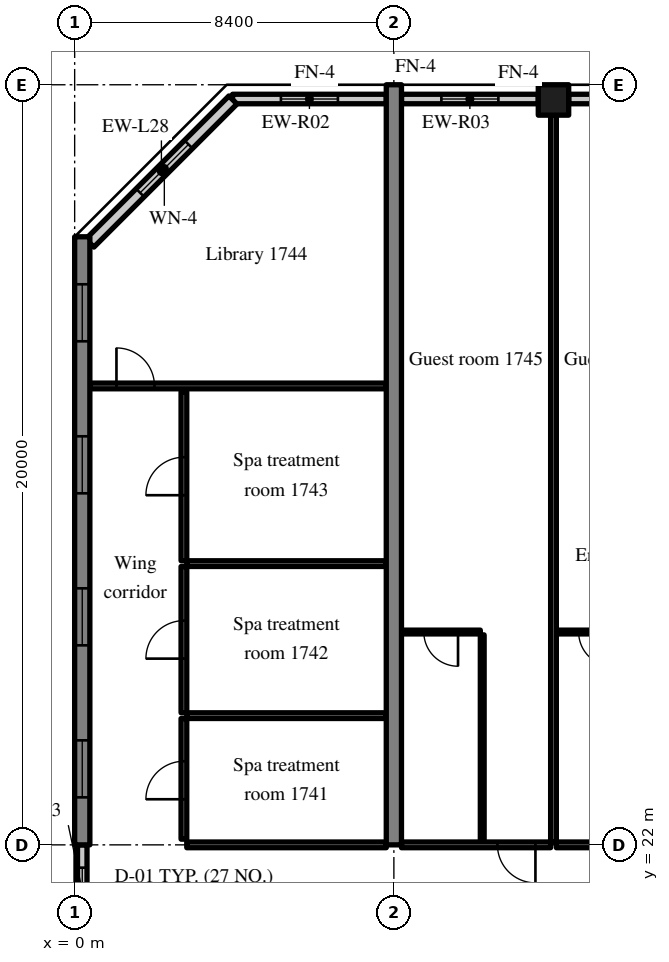
"""IFC4 building model, lengths in metres.
Left out: names, types, materials, properties, quantities, classifications, styles, units other than length and angle.
Written with IfcOpenShell. Run it as: python <this file> out.ifc"""

import sys

from ifc_helpers import new_model, si_unit, direction, frame, frame_2d, origin, origin_2d, place, context, subcontext, project, spatial, rectangle, extrude, source, transform, mapped, element, fill, save


model = new_model("IFC4")
c1 = context("Model", 3, precision=1e-05, world=origin(), true_north=direction((0.0, 1.0)))
c2 = subcontext(c1, "Body", "Model", "MODEL_VIEW")
j1 = project(units=[si_unit("LENGTHUNIT", "METRE"), si_unit("PLANEANGLEUNIT", "RADIAN")], contexts=[c1])
p1 = place(None, origin())
s1 = spatial("IfcSite", under=j1, at=p1, CompositionType="ELEMENT")
p2 = place(p1, origin())
s2 = spatial("IfcBuilding", under=s1, at=p2, CompositionType="ELEMENT")
p3 = place(p2, frame((0.0, 0.0, 73.4)))
s3 = spatial("IfcBuildingStorey", under=s2, at=p3, CompositionType="ELEMENT", Elevation=73.4)
m1 = source(origin(), c2, "Body", "SweptSolid", [
    extrude(rectangle(XDim=16.0, YDim=0.4, at=frame_2d((8.0, 0.0))), origin(), (0.0, 0.0, 1.0), 3.52),
])
p4 = place(p3, frame((0.2, 22.0, 0.0), z_axis=(0.0, 0.0, 1.0), x_axis=(0.0, 1.0, 0.0)))
e1 = element("IfcWall", 1, at=p4, inside=s3, PredefinedType="SHEAR", context=c2, shape_type="MappedRepresentation", body=[
    mapped(m1, transform((0.0, 0.0, 0.0), scale=1.0)),
])
m2 = source(origin(), c2, "Body", "SweptSolid", [
    extrude(rectangle(XDim=1.5, YDim=1.5, at=frame_2d((0.75, 0.75))), frame((0.0, 0.21, 0.0), z_axis=(0.0, -1.0, 0.0), x_axis=(1.0, 0.0, 0.0)), (0.0, 0.0, 1.0), 0.42),
])
p5 = place(p4, frame((1.25, 0.0, 0.9)))
e2 = element("IfcOpeningElement", 2, at=p5, cuts=e1, PredefinedType="OPENING", context=c2, shape_type="MappedRepresentation", body=[
    mapped(m2, transform((0.0, 0.0, 0.0), scale=1.0)),
])
p6 = place(p4, frame((5.25, 0.0, 0.9)))
e3 = element("IfcOpeningElement", 3, at=p6, cuts=e1, PredefinedType="OPENING", context=c2, shape_type="MappedRepresentation", body=[
    mapped(m2, transform((0.0, 0.0, 0.0), scale=1.0)),
])
p7 = place(p4, frame((9.25, 0.0, 0.9)))
e4 = element("IfcOpeningElement", 4, at=p7, cuts=e1, PredefinedType="OPENING", context=c2, shape_type="MappedRepresentation", body=[
    mapped(m2, transform((0.0, 0.0, 0.0), scale=1.0)),
])
p8 = place(p4, frame((13.25, 0.0, 0.9)))
e5 = element("IfcOpeningElement", 5, at=p8, cuts=e1, PredefinedType="OPENING", context=c2, shape_type="MappedRepresentation", body=[
    mapped(m2, transform((0.0, 0.0, 0.0), scale=1.0)),
])
m3 = source(origin(), c2, "Body", "SweptSolid", [
    extrude(rectangle(XDim=20.0, YDim=0.4, at=frame_2d((10.0, 0.0))), origin(), (0.0, 0.0, 1.0), 3.52),
])
p9 = place(p3, frame((8.4, 22.0, 0.0), z_axis=(0.0, 0.0, 1.0), x_axis=(0.0, 1.0, 0.0)))
e6 = element("IfcWall", 6, at=p9, inside=s3, PredefinedType="SHEAR", context=c2, shape_type="MappedRepresentation", body=[
    mapped(m3, transform((0.0, 0.0, 0.0), scale=1.0)),
])
m4 = source(origin(), c2, "Body", "SweptSolid", [
    extrude(rectangle(XDim=0.8, YDim=0.8, at=origin_2d()), origin(), (0.0, 0.0, 1.0), 3.52),
])
p10 = place(p3, frame((12.6, 41.6, 0.0), z_axis=(0.0, 0.0, 1.0), x_axis=(1.0, 0.0, 0.0)))
e7 = element("IfcColumn", 7, at=p10, inside=s3, PredefinedType="COLUMN", context=c2, shape_type="MappedRepresentation", body=[
    mapped(m4, transform((0.0, 0.0, 0.0), scale=1.0)),
])
m5 = source(origin(), c2, "Body", "SweptSolid", [
    extrude(rectangle(XDim=4.045, YDim=0.25, at=frame_2d((2.022, 0.0))), origin(), (0.0, 0.0, 1.0), 2.82),
])
p11 = place(p3, frame((8.2, 41.625, 0.0), z_axis=(0.0, 0.0, 1.0), x_axis=(-1.0, 0.0, 0.0)))
e8 = element("IfcWall", 8, at=p11, inside=s3, PredefinedType="SOLIDWALL", context=c2, shape_type="MappedRepresentation", body=[
    mapped(m5, transform((0.0, 0.0, 0.0), scale=1.0)),
])
m6 = source(origin(), c2, "Body", "SweptSolid", [
    extrude(rectangle(XDim=1.5, YDim=1.5, at=frame_2d((0.75, 0.75))), frame((0.0, 0.135, 0.0), z_axis=(0.0, -1.0, 0.0), x_axis=(1.0, 0.0, 0.0)), (0.0, 0.0, 1.0), 0.27),
])
p12 = place(p11, frame((1.272, 0.0, 0.9)))
e9 = element("IfcOpeningElement", 9, at=p12, cuts=e8, PredefinedType="OPENING", context=c2, shape_type="MappedRepresentation", body=[
    mapped(m6, transform((0.0, 0.0, 0.0), scale=1.0)),
])
m7 = source(origin(), c2, "Body", "SweptSolid", [
    extrude(rectangle(XDim=3.6, YDim=0.25, at=frame_2d((1.8, 0.0))), origin(), (0.0, 0.0, 1.0), 2.82),
])
p13 = place(p3, frame((12.2, 41.625, 0.0), z_axis=(0.0, 0.0, 1.0), x_axis=(-1.0, 0.0, 0.0)))
e10 = element("IfcWall", 10, at=p13, inside=s3, PredefinedType="SOLIDWALL", context=c2, shape_type="MappedRepresentation", body=[
    mapped(m7, transform((0.0, 0.0, 0.0), scale=1.0)),
])
p14 = place(p13, frame((1.05, 0.0, 0.9)))
e11 = element("IfcOpeningElement", 11, at=p14, cuts=e10, PredefinedType="OPENING", context=c2, shape_type="MappedRepresentation", body=[
    mapped(m6, transform((0.0, 0.0, 0.0), scale=1.0)),
])
m8 = source(origin(), c2, "Body", "SweptSolid", [
    extrude(rectangle(XDim=3.6, YDim=0.25, at=frame_2d((1.8, 0.0))), origin(), (0.0, 0.0, 1.0), 2.82),
])
p15 = place(p3, frame((16.6, 41.625, 0.0), z_axis=(0.0, 0.0, 1.0), x_axis=(-1.0, 0.0, 0.0)))
e12 = element("IfcWall", 12, at=p15, inside=s3, PredefinedType="SOLIDWALL", context=c2, shape_type="MappedRepresentation", body=[
    mapped(m8, transform((0.0, 0.0, 0.0), scale=1.0)),
])
p16 = place(p15, frame((1.05, 0.0, 0.9)))
e13 = element("IfcOpeningElement", 13, at=p16, cuts=e12, PredefinedType="OPENING", context=c2, shape_type="MappedRepresentation", body=[
    mapped(m6, transform((0.0, 0.0, 0.0), scale=1.0)),
])
m9 = source(origin(), c2, "Body", "SweptSolid", [
    extrude(rectangle(XDim=5.326, YDim=0.3, at=frame_2d((2.663, 0.0))), origin(), (0.0, 0.0, 1.0), 3.52),
])
p17 = place(p3, frame((4.166, 41.6, 0.0), z_axis=(0.0, 0.0, 1.0), x_axis=(-0.707106781187, -0.707106781187, 0.0)))
e14 = element("IfcWall", 14, at=p17, inside=s3, PredefinedType="SOLIDWALL", context=c2, shape_type="MappedRepresentation", body=[
    mapped(m9, transform((0.0, 0.0, 0.0), scale=1.0)),
])
m10 = source(origin(), c2, "Body", "SweptSolid", [
    extrude(rectangle(XDim=1.8, YDim=1.5, at=frame_2d((0.9, 0.75))), frame((0.0, 0.16, 0.0), z_axis=(0.0, -1.0, 0.0), x_axis=(1.0, 0.0, 0.0)), (0.0, 0.0, 1.0), 0.32),
])
p18 = place(p17, frame((1.654, 0.0, 0.9)))
e15 = element("IfcOpeningElement", 15, at=p18, cuts=e14, PredefinedType="OPENING", context=c2, shape_type="MappedRepresentation", body=[
    mapped(m10, transform((0.0, 0.0, 0.0), scale=1.0)),
])
m11 = source(origin(), c2, "Body", "SweptSolid", [
    extrude(rectangle(XDim=2.4, YDim=0.25, at=frame_2d((1.2, 0.0))), origin(), (0.0, 0.0, 1.0), 2.62),
])
p19 = place(p3, frame((0.2, 19.6, 0.0), z_axis=(0.0, 0.0, 1.0), x_axis=(0.0, 1.0, 0.0)))
e16 = element("IfcWall", 16, at=p19, inside=s3, PredefinedType="SOLIDWALL", context=c2, shape_type="MappedRepresentation", body=[
    mapped(m11, transform((0.0, 0.0, 0.0), scale=1.0)),
])
m12 = source(origin(), c2, "Body", "SweptSolid", [
    extrude(rectangle(XDim=1.2, YDim=1.5, at=frame_2d((0.6, 0.75))), frame((0.0, 0.135, 0.0), z_axis=(0.0, -1.0, 0.0), x_axis=(1.0, 0.0, 0.0)), (0.0, 0.0, 1.0), 0.27),
])
p20 = place(p19, frame((0.6, 0.0, 0.9)))
e17 = element("IfcOpeningElement", 17, at=p20, cuts=e16, PredefinedType="OPENING", context=c2, shape_type="MappedRepresentation", body=[
    mapped(m12, transform((0.0, 0.0, 0.0), scale=1.0)),
])
m13 = source(origin(), c2, "Body", "SweptSolid", [
    extrude(rectangle(XDim=5.25, YDim=0.15, at=frame_2d((2.625, 0.0))), origin(), (0.0, 0.0, 1.0), 2.82),
])
p21 = place(p3, frame((2.95, 22.0, 0.0), z_axis=(0.0, 0.0, 1.0), x_axis=(1.0, 0.0, 0.0)))
e18 = element("IfcWall", 18, at=p21, inside=s3, PredefinedType="PARTITIONING", context=c2, shape_type="MappedRepresentation", body=[
    mapped(m13, transform((0.0, 0.0, 0.0), scale=1.0)),
])
m14 = source(origin(), c2, "Body", "SweptSolid", [
    extrude(rectangle(XDim=3.175, YDim=0.15, at=frame_2d((1.587, 0.0))), origin(), (0.0, 0.0, 1.0), 3.52),
])
p22 = place(p3, frame((2.875, 22.15, 0.0), z_axis=(0.0, 0.0, 1.0), x_axis=(0.0, 1.0, 0.0)))
e19 = element("IfcWall", 19, at=p22, inside=s3, PredefinedType="PARTITIONING", context=c2, shape_type="MappedRepresentation", body=[
    mapped(m14, transform((0.0, 0.0, 0.0), scale=1.0)),
])
m15 = source(origin(), c2, "Body", "SweptSolid", [
    extrude(rectangle(XDim=1.0, YDim=2.1, at=frame_2d((0.5, 1.05))), frame((0.0, 0.085, 0.0), z_axis=(0.0, -1.0, 0.0), x_axis=(1.0, 0.0, 0.0)), (0.0, 0.0, 1.0), 0.17),
])
p23 = place(p22, frame((1.05, 0.0, 0.0)))
e20 = element("IfcOpeningElement", 20, at=p23, cuts=e19, PredefinedType="OPENING", context=c2, shape_type="MappedRepresentation", body=[
    mapped(m15, transform((0.0, 0.0, 0.0), scale=1.0)),
])
m16 = source(origin(), c2, "Body", "SweptSolid", [
    extrude(rectangle(XDim=5.25, YDim=0.15, at=frame_2d((2.625, 0.0))), origin(), (0.0, 0.0, 1.0), 3.52),
])
p24 = place(p3, frame((2.95, 25.4, 0.0), z_axis=(0.0, 0.0, 1.0), x_axis=(1.0, 0.0, 0.0)))
e21 = element("IfcWall", 21, at=p24, inside=s3, PredefinedType="PARTITIONING", context=c2, shape_type="MappedRepresentation", body=[
    mapped(m16, transform((0.0, 0.0, 0.0), scale=1.0)),
])
m17 = source(origin(), c2, "Body", "SweptSolid", [
    extrude(rectangle(XDim=3.85, YDim=0.15, at=frame_2d((1.925, 0.0))), origin(), (0.0, 0.0, 1.0), 3.52),
])
p25 = place(p3, frame((2.875, 25.475, 0.0), z_axis=(0.0, 0.0, 1.0), x_axis=(0.0, 1.0, 0.0)))
e22 = element("IfcWall", 22, at=p25, inside=s3, PredefinedType="PARTITIONING", context=c2, shape_type="MappedRepresentation", body=[
    mapped(m17, transform((0.0, 0.0, 0.0), scale=1.0)),
])
p26 = place(p25, frame((1.425, 0.0, 0.0)))
e23 = element("IfcOpeningElement", 23, at=p26, cuts=e22, PredefinedType="OPENING", context=c2, shape_type="MappedRepresentation", body=[
    mapped(m15, transform((0.0, 0.0, 0.0), scale=1.0)),
])
p27 = place(p3, frame((2.95, 29.4, 0.0), z_axis=(0.0, 0.0, 1.0), x_axis=(1.0, 0.0, 0.0)))
e24 = element("IfcWall", 24, at=p27, inside=s3, PredefinedType="PARTITIONING", context=c2, shape_type="MappedRepresentation", body=[
    mapped(m16, transform((0.0, 0.0, 0.0), scale=1.0)),
])
m18 = source(origin(), c2, "Body", "SweptSolid", [
    extrude(rectangle(XDim=4.45, YDim=0.15, at=frame_2d((2.225, 0.0))), origin(), (0.0, 0.0, 1.0), 3.52),
])
p28 = place(p3, frame((2.875, 29.475, 0.0), z_axis=(0.0, 0.0, 1.0), x_axis=(0.0, 1.0, 0.0)))
e25 = element("IfcWall", 25, at=p28, inside=s3, PredefinedType="PARTITIONING", context=c2, shape_type="MappedRepresentation", body=[
    mapped(m18, transform((0.0, 0.0, 0.0), scale=1.0)),
])
p29 = place(p28, frame((1.725, 0.0, 0.0)))
e26 = element("IfcOpeningElement", 26, at=p29, cuts=e25, PredefinedType="OPENING", context=c2, shape_type="MappedRepresentation", body=[
    mapped(m15, transform((0.0, 0.0, 0.0), scale=1.0)),
])
m19 = source(origin(), c2, "Body", "SweptSolid", [
    extrude(rectangle(XDim=7.8, YDim=0.15, at=frame_2d((3.9, 0.0))), origin(), (0.0, 0.0, 1.0), 3.52),
])
p30 = place(p3, frame((0.4, 34.075, 0.0), z_axis=(0.0, 0.0, 1.0), x_axis=(1.0, 0.0, 0.0)))
e27 = element("IfcWall", 27, at=p30, inside=s3, PredefinedType="PARTITIONING", context=c2, shape_type="MappedRepresentation", body=[
    mapped(m19, transform((0.0, 0.0, 0.0), scale=1.0)),
])
p31 = place(p30, frame((0.7, 0.0, 0.0)))
e28 = element("IfcOpeningElement", 28, at=p31, cuts=e27, PredefinedType="OPENING", context=c2, shape_type="MappedRepresentation", body=[
    mapped(m15, transform((0.0, 0.0, 0.0), scale=1.0)),
])
m20 = source(origin(), c2, "Body", "SweptSolid", [
    extrude(rectangle(XDim=5.45, YDim=0.1, at=frame_2d((2.725, 0.0))), origin(), (0.0, 0.0, 1.0), 3.52),
])
p32 = place(p3, frame((10.725, 22.075, 0.0), z_axis=(0.0, 0.0, 1.0), x_axis=(0.0, 1.0, 0.0)))
e29 = element("IfcWall", 29, at=p32, inside=s3, PredefinedType="PARTITIONING", context=c2, shape_type="MappedRepresentation", body=[
    mapped(m20, transform((0.0, 0.0, 0.0), scale=1.0)),
])
m21 = source(origin(), c2, "Body", "SweptSolid", [
    extrude(rectangle(XDim=2.075, YDim=0.1, at=frame_2d((1.038, 0.0))), origin(), (0.0, 0.0, 1.0), 3.52),
])
p33 = place(p3, frame((8.6, 27.6, 0.0), z_axis=(0.0, 0.0, 1.0), x_axis=(1.0, 0.0, 0.0)))
e30 = element("IfcWall", 30, at=p33, inside=s3, PredefinedType="PARTITIONING", context=c2, shape_type="MappedRepresentation", body=[
    mapped(m21, transform((0.0, 0.0, 0.0), scale=1.0)),
])
m22 = source(origin(), c2, "Body", "SweptSolid", [
    extrude(rectangle(XDim=0.9, YDim=2.1, at=frame_2d((0.45, 1.05))), frame((0.0, 0.06, 0.0), z_axis=(0.0, -1.0, 0.0), x_axis=(1.0, 0.0, 0.0)), (0.0, 0.0, 1.0), 0.12),
])
p34 = place(p33, frame((0.588, 0.0, 0.0)))
e31 = element("IfcOpeningElement", 31, at=p34, cuts=e30, PredefinedType="OPENING", context=c2, shape_type="MappedRepresentation", body=[
    mapped(m22, transform((0.0, 0.0, 0.0), scale=1.0)),
])
m23 = source(origin(), c2, "Body", "SweptSolid", [
    extrude(rectangle(XDim=3.925, YDim=0.15, at=frame_2d((1.962, 0.0))), origin(), (0.0, 0.0, 1.0), 2.82),
])
p35 = place(p3, frame((8.6, 22.0, 0.0), z_axis=(0.0, 0.0, 1.0), x_axis=(1.0, 0.0, 0.0)))
e32 = element("IfcWall", 32, at=p35, inside=s3, PredefinedType="PARTITIONING", context=c2, shape_type="MappedRepresentation", body=[
    mapped(m23, transform((0.0, 0.0, 0.0), scale=1.0)),
])
p36 = place(p35, frame((2.525, 0.0, 0.0)))
e33 = element("IfcOpeningElement", 33, at=p36, cuts=e32, PredefinedType="OPENING", context=c2, shape_type="MappedRepresentation", body=[
    mapped(m15, transform((0.0, 0.0, 0.0), scale=1.0)),
])
p37 = place(p3, frame((12.675, 27.6, 0.0), z_axis=(0.0, 0.0, 1.0), x_axis=(1.0, 0.0, 0.0)))
e34 = element("IfcWall", 34, at=p37, inside=s3, PredefinedType="PARTITIONING", context=c2, shape_type="MappedRepresentation", body=[
    mapped(m21, transform((0.0, 0.0, 0.0), scale=1.0)),
])
p38 = place(p37, frame((0.587, 0.0, 0.0)))
e35 = element("IfcOpeningElement", 35, at=p38, cuts=e34, PredefinedType="OPENING", context=c2, shape_type="MappedRepresentation", body=[
    mapped(m22, transform((0.0, 0.0, 0.0), scale=1.0)),
])
m24 = source(origin(), c2, "Body", "SweptSolid", [
    extrude(rectangle(XDim=3.925, YDim=0.15, at=frame_2d((1.962, 0.0))), origin(), (0.0, 0.0, 1.0), 2.82),
])
p39 = place(p3, frame((12.675, 22.0, 0.0), z_axis=(0.0, 0.0, 1.0), x_axis=(1.0, 0.0, 0.0)))
e36 = element("IfcWall", 36, at=p39, inside=s3, PredefinedType="PARTITIONING", context=c2, shape_type="MappedRepresentation", body=[
    mapped(m24, transform((0.0, 0.0, 0.0), scale=1.0)),
])
p40 = place(p39, frame((2.525, 0.0, 0.0)))
e37 = element("IfcOpeningElement", 37, at=p40, cuts=e36, PredefinedType="OPENING", context=c2, shape_type="MappedRepresentation", body=[
    mapped(m15, transform((0.0, 0.0, 0.0), scale=1.0)),
])
m25 = source(origin(), c2, "Body", "SweptSolid", [
    extrude(rectangle(XDim=19.125, YDim=0.15, at=frame_2d((9.562, 0.0))), origin(), (0.0, 0.0, 1.0), 3.52),
])
p41 = place(p3, frame((12.6, 22.075, 0.0), z_axis=(0.0, 0.0, 1.0), x_axis=(0.0, 1.0, 0.0)))
e38 = element("IfcWall", 38, at=p41, inside=s3, PredefinedType="PARTITIONING", context=c2, shape_type="MappedRepresentation", body=[
    mapped(m25, transform((0.0, 0.0, 0.0), scale=1.0)),
])
m26 = source(origin(), c2, "Body", "SweptSolid", [
    extrude(rectangle(XDim=1.5, YDim=1.5, at=frame_2d((0.75, 0.75))), frame((0.0, 0.03, 0.0), z_axis=(0.0, -1.0, 0.0), x_axis=(1.0, 0.0, 0.0)), (0.0, 0.0, 1.0), 0.06),
])
p42 = place(p12, origin())
e39 = element("IfcWindow", 39, at=p42, inside=s3, PartitioningType="SINGLE_PANEL", PredefinedType="WINDOW", context=c2, shape_type="MappedRepresentation", body=[
    mapped(m26, transform((0.0, 0.0, 0.0), scale=1.0)),
])
fill(e9, e39)
p43 = place(p14, origin())
e40 = element("IfcWindow", 40, at=p43, inside=s3, PartitioningType="SINGLE_PANEL", PredefinedType="WINDOW", context=c2, shape_type="MappedRepresentation", body=[
    mapped(m26, transform((0.0, 0.0, 0.0), scale=1.0)),
])
fill(e11, e40)
m27 = source(origin(), c2, "Body", "SweptSolid", [
    extrude(rectangle(XDim=1.8, YDim=1.5, at=frame_2d((0.9, 0.75))), frame((0.0, 0.03, 0.0), z_axis=(0.0, -1.0, 0.0), x_axis=(1.0, 0.0, 0.0)), (0.0, 0.0, 1.0), 0.06),
])
p44 = place(p18, origin())
e41 = element("IfcWindow", 41, at=p44, inside=s3, PartitioningType="SINGLE_PANEL", PredefinedType="WINDOW", context=c2, shape_type="MappedRepresentation", body=[
    mapped(m27, transform((0.0, 0.0, 0.0), scale=1.0)),
])
fill(e15, e41)
p45 = place(p5, origin())
e42 = element("IfcWindow", 42, at=p45, inside=s3, PartitioningType="SINGLE_PANEL", PredefinedType="WINDOW", context=c2, shape_type="MappedRepresentation", body=[
    mapped(m26, transform((0.0, 0.0, 0.0), scale=1.0)),
])
fill(e2, e42)
p46 = place(p6, origin())
e43 = element("IfcWindow", 43, at=p46, inside=s3, PartitioningType="SINGLE_PANEL", PredefinedType="WINDOW", context=c2, shape_type="MappedRepresentation", body=[
    mapped(m26, transform((0.0, 0.0, 0.0), scale=1.0)),
])
fill(e3, e43)
p47 = place(p7, origin())
e44 = element("IfcWindow", 44, at=p47, inside=s3, PartitioningType="SINGLE_PANEL", PredefinedType="WINDOW", context=c2, shape_type="MappedRepresentation", body=[
    mapped(m26, transform((0.0, 0.0, 0.0), scale=1.0)),
])
fill(e4, e44)
p48 = place(p8, origin())
e45 = element("IfcWindow", 45, at=p48, inside=s3, PartitioningType="SINGLE_PANEL", PredefinedType="WINDOW", context=c2, shape_type="MappedRepresentation", body=[
    mapped(m26, transform((0.0, 0.0, 0.0), scale=1.0)),
])
fill(e5, e45)
m28 = source(origin(), c2, "Body", "SweptSolid", [
    extrude(rectangle(XDim=1.2, YDim=1.5, at=frame_2d((0.6, 0.75))), frame((0.0, 0.03, 0.0), z_axis=(0.0, -1.0, 0.0), x_axis=(1.0, 0.0, 0.0)), (0.0, 0.0, 1.0), 0.06),
])
p49 = place(p20, origin())
e46 = element("IfcWindow", 46, at=p49, inside=s3, PartitioningType="SINGLE_PANEL", PredefinedType="WINDOW", context=c2, shape_type="MappedRepresentation", body=[
    mapped(m28, transform((0.0, 0.0, 0.0), scale=1.0)),
])
fill(e17, e46)
m29 = source(origin(), c2, "Body", "SweptSolid", [
    extrude(rectangle(XDim=1.0, YDim=2.1, at=frame_2d((0.5, 1.05))), frame((0.0, 0.025, 0.0), z_axis=(0.0, -1.0, 0.0), x_axis=(1.0, 0.0, 0.0)), (0.0, 0.0, 1.0), 0.05),
])
p50 = place(p23, origin())
e47 = element("IfcDoor", 47, at=p50, inside=s3, OperationType="SINGLE_SWING_LEFT", PredefinedType="DOOR", context=c2, shape_type="MappedRepresentation", body=[
    mapped(m29, transform((0.0, 0.0, 0.0), scale=1.0)),
])
fill(e20, e47)
p51 = place(p26, origin())
e48 = element("IfcDoor", 48, at=p51, inside=s3, OperationType="SINGLE_SWING_LEFT", PredefinedType="DOOR", context=c2, shape_type="MappedRepresentation", body=[
    mapped(m29, transform((0.0, 0.0, 0.0), scale=1.0)),
])
fill(e23, e48)
p52 = place(p29, origin())
e49 = element("IfcDoor", 49, at=p52, inside=s3, OperationType="SINGLE_SWING_LEFT", PredefinedType="DOOR", context=c2, shape_type="MappedRepresentation", body=[
    mapped(m29, transform((0.0, 0.0, 0.0), scale=1.0)),
])
fill(e26, e49)
p53 = place(p31, origin())
e50 = element("IfcDoor", 50, at=p53, inside=s3, OperationType="SINGLE_SWING_LEFT", PredefinedType="DOOR", context=c2, shape_type="MappedRepresentation", body=[
    mapped(m29, transform((0.0, 0.0, 0.0), scale=1.0)),
])
fill(e28, e50)
m30 = source(origin(), c2, "Body", "SweptSolid", [
    extrude(rectangle(XDim=0.9, YDim=2.1, at=frame_2d((0.45, 1.05))), frame((0.0, 0.025, 0.0), z_axis=(0.0, -1.0, 0.0), x_axis=(1.0, 0.0, 0.0)), (0.0, 0.0, 1.0), 0.05),
])
p54 = place(p34, origin())
e51 = element("IfcDoor", 51, at=p54, inside=s3, OperationType="SINGLE_SWING_RIGHT", PredefinedType="DOOR", context=c2, shape_type="MappedRepresentation", body=[
    mapped(m30, transform((0.0, 0.0, 0.0), scale=1.0)),
])
fill(e31, e51)
p55 = place(p36, origin())
e52 = element("IfcDoor", 52, at=p55, inside=s3, OperationType="SINGLE_SWING_RIGHT", PredefinedType="DOOR", context=c2, shape_type="MappedRepresentation", body=[
    mapped(m29, transform((0.0, 0.0, 0.0), scale=1.0)),
])
fill(e33, e52)
p56 = place(p38, origin())
e53 = element("IfcDoor", 53, at=p56, inside=s3, OperationType="SINGLE_SWING_RIGHT", PredefinedType="DOOR", context=c2, shape_type="MappedRepresentation", body=[
    mapped(m30, transform((0.0, 0.0, 0.0), scale=1.0)),
])
fill(e35, e53)
save(model, sys.argv[1])
